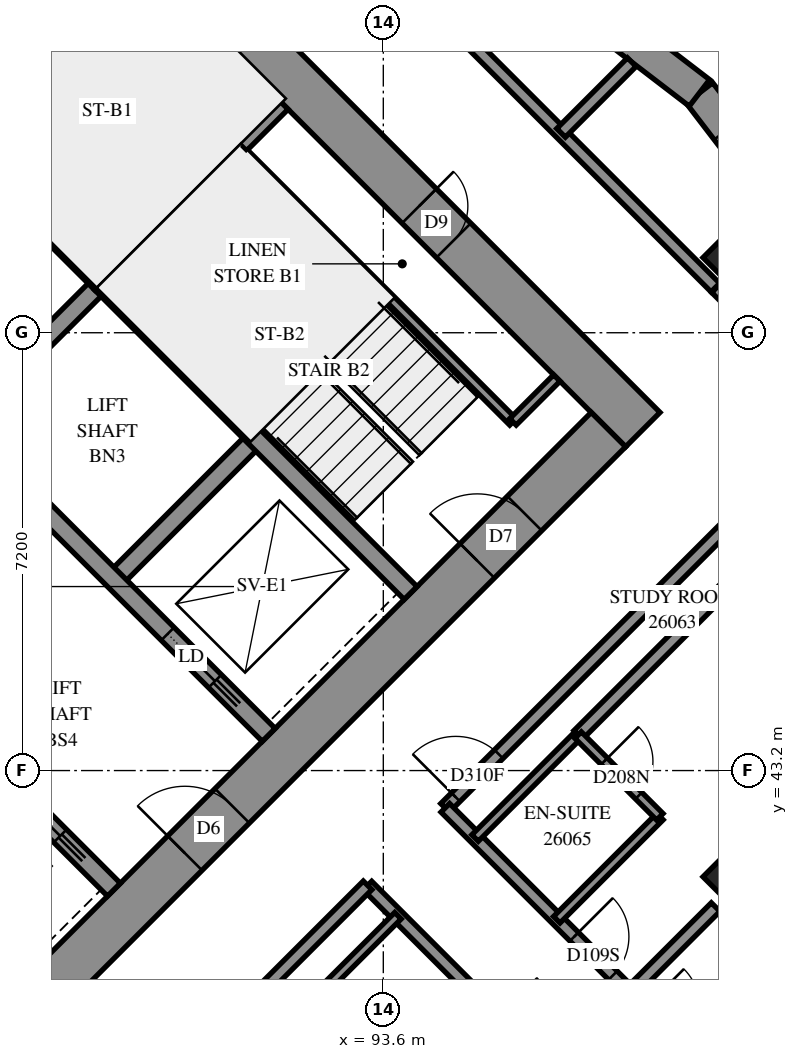
"""IFC4 building model, lengths in metres.
Left out: names, types, materials, properties, quantities, classifications, styles, units other than length and angle.
Written with IfcOpenShell. Run it as: python <this file> out.ifc"""

import sys

from ifc_helpers import new_model, si_unit, direction, frame, frame_2d, origin, origin_2d, place, context, subcontext, project, spatial, polyline, rectangle, outline, extrude, element, fill, save


model = new_model("IFC4")
c1 = context("Model", 3, precision=1e-05, world=origin(), true_north=direction((0.0, 1.0)))
c2 = subcontext(c1, "Body", "Model", "MODEL_VIEW")
j1 = project(units=[si_unit("LENGTHUNIT", "METRE"), si_unit("PLANEANGLEUNIT", "RADIAN")], contexts=[c1])
p1 = place(None, origin())
s1 = spatial("IfcSite", under=j1, at=p1, CompositionType="ELEMENT")
p2 = place(p1, origin())
s2 = spatial("IfcBuilding", under=s1, at=p2, CompositionType="ELEMENT")
p3 = place(p2, frame((0.0, 0.0, 98.2)))
s3 = spatial("IfcBuildingStorey", under=s2, at=p3, CompositionType="ELEMENT", Elevation=98.2)
for number, where, z_axis, x_axis in (
    (1, (99.565, 51.635, 0.0), (0.0, 0.0, 1.0), (0.707, -0.707, 0.0)),
    (2, (99.565, 41.453, 0.0), (0.0, 0.0, 1.0), (0.707, -0.707, 0.0)),
):
    element("IfcColumn", number, at=place(p3, frame(where, z_axis=z_axis, x_axis=x_axis)), inside=s3, PredefinedType="COLUMN", context=c2, shape_type="SweptSolid", body=[
        extrude(rectangle(XDim=1.0, YDim=1.0, at=origin_2d()), origin(), (0.0, 0.0, 1.0), 3.1),
    ])
p4 = place(p3, frame((86.554, 60.121, -0.3), z_axis=(0.0, 0.0, 1.0), x_axis=(0.7071067812, -0.7071067812, 0.0)))
e3 = element("IfcWall", 3, at=p4, inside=s3, PredefinedType="SHEAR", context=c2, shape_type="SweptSolid", body=[
    extrude(rectangle(XDim=16.0, YDim=0.8, at=frame_2d((8.0, 0.0))), origin(), (0.0, 0.0, 1.0), 2.7),
])
p5 = place(p4, frame((10.8, 0.0, 0.3)))
e4 = element("IfcOpeningElement", 4, at=p5, cuts=e3, PredefinedType="OPENING", context=c2, shape_type="SweptSolid", body=[
    extrude(rectangle(XDim=0.8, YDim=2.1, at=frame_2d((0.4, 1.05))), frame((0.0, 0.41, 0.0), z_axis=(0.0, -1.0, 0.0), x_axis=(1.0, 0.0, 0.0)), (0.0, 0.0, 1.0), 0.82),
])
p6 = place(p3, frame((87.12, 38.625, -0.3), z_axis=(0.0, 0.0, 1.0), x_axis=(0.7071067812, 0.7071067812, 0.0)))
e5 = element("IfcWall", 5, at=p6, inside=s3, PredefinedType="SHEAR", context=c2, shape_type="SweptSolid", body=[
    extrude(rectangle(XDim=14.4, YDim=0.8, at=frame_2d((7.2, 0.0))), origin(), (0.0, 0.0, 1.0), 2.7),
])
p7 = place(p6, frame((4.55, 0.0, 0.3)))
e6 = element("IfcOpeningElement", 6, at=p7, cuts=e5, PredefinedType="OPENING", context=c2, shape_type="SweptSolid", body=[
    extrude(rectangle(XDim=1.1, YDim=2.1, at=frame_2d((0.55, 1.05))), frame((0.0, 0.41, 0.0), z_axis=(0.0, -1.0, 0.0), x_axis=(1.0, 0.0, 0.0)), (0.0, 0.0, 1.0), 0.82),
])
p8 = place(p6, frame((11.35, 0.0, 0.3)))
e7 = element("IfcOpeningElement", 7, at=p8, cuts=e5, PredefinedType="OPENING", context=c2, shape_type="SweptSolid", body=[
    extrude(rectangle(XDim=1.1, YDim=2.1, at=frame_2d((0.55, 1.05))), frame((0.0, 0.41, 0.0), z_axis=(0.0, -1.0, 0.0), x_axis=(1.0, 0.0, 0.0)), (0.0, 0.0, 1.0), 0.82),
])
for number, where, z_axis, x_axis in (
    (8, (86.625, 48.878, 0.0), (0.0, 0.0, 1.0), (0.707, 0.707, 0.0)),
    (9, (89.17, 46.332, 0.0), (0.0, 0.0, 1.0), (0.707, 0.707, 0.0)),
):
    element("IfcWall", number, at=place(p3, frame(where, z_axis=z_axis, x_axis=x_axis)), inside=s3, PredefinedType="SOLIDWALL", context=c2, shape_type="SweptSolid", body=[
        extrude(rectangle(XDim=3.3, YDim=0.3, at=frame_2d((1.65, 0.0))), origin(), (0.0, 0.0, 1.0), 3.1),
    ])
p9 = place(p3, frame((78.988, 51.423, 0.0), z_axis=(0.0, 0.0, 1.0), x_axis=(0.7071067812, -0.7071067812, 0.0)))
e10 = element("IfcWall", 10, at=p9, inside=s3, PredefinedType="SOLIDWALL", context=c2, shape_type="SweptSolid", body=[
    extrude(rectangle(XDim=14.4, YDim=0.3, at=frame_2d((7.2, 0.0))), origin(), (0.0, 0.0, 1.0), 3.1),
])
p10 = place(p9, frame((1.25, 0.0, 0.0)))
e11 = element("IfcOpeningElement", 11, at=p10, cuts=e10, PredefinedType="OPENING", context=c2, shape_type="SweptSolid", body=[
    extrude(rectangle(XDim=1.1, YDim=2.1, at=frame_2d((0.55, 1.05))), frame((0.0, 0.16, 0.0), z_axis=(0.0, -1.0, 0.0), x_axis=(1.0, 0.0, 0.0)), (0.0, 0.0, 1.0), 0.32),
])
p11 = place(p9, frame((4.85, 0.0, 0.0)))
e12 = element("IfcOpeningElement", 12, at=p11, cuts=e10, PredefinedType="OPENING", context=c2, shape_type="SweptSolid", body=[
    extrude(rectangle(XDim=1.1, YDim=2.1, at=frame_2d((0.55, 1.05))), frame((0.0, 0.16, 0.0), z_axis=(0.0, -1.0, 0.0), x_axis=(1.0, 0.0, 0.0)), (0.0, 0.0, 1.0), 0.32),
])
p12 = place(p9, frame((8.45, 0.0, 0.0)))
e13 = element("IfcOpeningElement", 13, at=p12, cuts=e10, PredefinedType="OPENING", context=c2, shape_type="SweptSolid", body=[
    extrude(rectangle(XDim=1.1, YDim=2.1, at=frame_2d((0.55, 1.05))), frame((0.0, 0.16, 0.0), z_axis=(0.0, -1.0, 0.0), x_axis=(1.0, 0.0, 0.0)), (0.0, 0.0, 1.0), 0.32),
])
p13 = place(p9, frame((12.05, 0.0, 0.0)))
e14 = element("IfcOpeningElement", 14, at=p13, cuts=e10, PredefinedType="OPENING", context=c2, shape_type="SweptSolid", body=[
    extrude(rectangle(XDim=1.1, YDim=2.1, at=frame_2d((0.55, 1.05))), frame((0.0, 0.16, 0.0), z_axis=(0.0, -1.0, 0.0), x_axis=(1.0, 0.0, 0.0)), (0.0, 0.0, 1.0), 0.32),
])
p14 = place(p3, frame((81.534, 53.969, 0.0), z_axis=(0.0, 0.0, 1.0), x_axis=(0.707103309, -0.7071102534, 0.0)))
e15 = element("IfcWall", 15, at=p14, inside=s3, PredefinedType="SOLIDWALL", context=c2, shape_type="SweptSolid", body=[
    extrude(rectangle(XDim=14.4, YDim=0.3, at=frame_2d((7.2, 0.0))), origin(), (0.0, 0.0, 1.0), 3.1),
])
p15 = place(p14, frame((12.05, 0.0, 0.0)))
e16 = element("IfcOpeningElement", 16, at=p15, cuts=e15, PredefinedType="OPENING", context=c2, shape_type="SweptSolid", body=[
    extrude(rectangle(XDim=1.1, YDim=2.1, at=frame_2d((0.55, 1.05))), frame((0.0, 0.16, 0.0), z_axis=(0.0, -1.0, 0.0), x_axis=(1.0, 0.0, 0.0)), (0.0, 0.0, 1.0), 0.32),
])
for number, where, z_axis, x_axis in (
    (17, (83.867, 56.302, 0.0), (0.0, 0.0, 1.0), (0.707, -0.707, 0.0)),
    (18, (88.958, 51.211, 0.0), (0.0, 0.0, 1.0), (0.707, -0.707, 0.0)),
):
    element("IfcWall", number, at=place(p3, frame(where, z_axis=z_axis, x_axis=x_axis)), inside=s3, PredefinedType="SOLIDWALL", context=c2, shape_type="SweptSolid", body=[
        extrude(rectangle(XDim=7.2, YDim=0.3, at=frame_2d((3.6, 0.0))), origin(), (0.0, 0.0, 1.0), 3.1),
    ])
p16 = place(p3, frame((88.958, 51.211, 0.0), z_axis=(0.0, 0.0, 1.0), x_axis=(0.7071067812, 0.7071067812, 0.0)))
e19 = element("IfcWall", 19, at=p16, inside=s3, PredefinedType="SOLIDWALL", context=c2, shape_type="SweptSolid", body=[
    extrude(rectangle(XDim=4.2, YDim=0.3, at=frame_2d((2.1, 0.0))), origin(), (0.0, 0.0, 1.0), 3.1),
])
p17 = place(p3, frame((100.891, 51.614, 0.0), z_axis=(0.0, 0.0, 1.0), x_axis=(-0.6082581669, 0.7937392534, 0.0)))
e20 = element("IfcWall", 20, at=p17, inside=s3, PredefinedType="SOLIDWALL", context=c2, shape_type="SweptSolid", body=[
    extrude(outline(polyline([(0.036, -0.275), (3.475, -0.275), (3.403, 0.275), (-0.036, 0.275), (0.036, -0.275)])), origin(), (0.0, 0.0, 1.0), 3.1),
])
p18 = place(p17, frame((1.482, 0.0, 0.5)))
e21 = element("IfcOpeningElement", 21, at=p18, cuts=e20, PredefinedType="OPENING", context=c2, shape_type="SweptSolid", body=[
    extrude(rectangle(XDim=1.2, YDim=2.45, at=frame_2d((0.6, 1.225))), frame((0.0, 0.285, 0.0), z_axis=(0.0, -1.0, 0.0), x_axis=(1.0, 0.0, 0.0)), (0.0, 0.0, 1.0), 0.57),
])
p19 = place(p3, frame((98.799, 54.344, 0.0), z_axis=(0.0, 0.0, 1.0), x_axis=(-0.7937392534, 0.6082581669, 0.0)))
e22 = element("IfcWall", 22, at=p19, inside=s3, PredefinedType="SOLIDWALL", context=c2, shape_type="SweptSolid", body=[
    extrude(outline(polyline([(-0.036, -0.275), (3.403, -0.275), (3.475, 0.275), (0.036, 0.275), (-0.036, -0.275)])), origin(), (0.0, 0.0, 1.0), 3.1),
])
p20 = place(p19, frame((1.596, 0.0, 0.5)))
e23 = element("IfcOpeningElement", 23, at=p20, cuts=e22, PredefinedType="OPENING", context=c2, shape_type="SweptSolid", body=[
    extrude(rectangle(XDim=1.2, YDim=2.45, at=frame_2d((0.6, 1.225))), frame((0.0, 0.285, 0.0), z_axis=(0.0, -1.0, 0.0), x_axis=(1.0, 0.0, 0.0)), (0.0, 0.0, 1.0), 0.57),
])
p21 = place(p3, frame((91.313, 53.354, 0.0), z_axis=(0.0, 0.0, 1.0), x_axis=(0.7071147811, -0.7070987812, 0.0)))
e24 = element("IfcWall", 24, at=p21, inside=s3, PredefinedType="PARTITIONING", context=c2, shape_type="SweptSolid", body=[
    extrude(rectangle(XDim=6.25, YDim=0.15, at=frame_2d((3.125, 0.0))), origin(), (0.0, 0.0, 1.0), 3.1),
])
p22 = place(p3, frame((95.732, 48.934, 0.0), z_axis=(0.0, 0.0, 1.0), x_axis=(0.7071067812, 0.7071067812, 0.0)))
e25 = element("IfcWall", 25, at=p22, inside=s3, PredefinedType="PARTITIONING", context=c2, shape_type="SweptSolid", body=[
    extrude(rectangle(XDim=1.02, YDim=0.15, at=frame_2d((0.51, 0.0))), origin(), (0.0, 0.0, 1.0), 3.1),
])
p23 = place(p3, frame((93.339, 41.309, 0.0), z_axis=(0.0, 0.0, 1.0), x_axis=(0.7071067812, -0.7071067812, 0.0)))
e26 = element("IfcWall", 26, at=p23, inside=s3, PredefinedType="PARTITIONING", context=c2, shape_type="SweptSolid", body=[
    extrude(rectangle(XDim=18.702, YDim=0.2, at=frame_2d((9.351, 0.0))), origin(), (0.0, 0.0, 1.0), 3.1),
])
p24 = place(p23, frame((3.05, 0.0, 0.0)))
e27 = element("IfcOpeningElement", 27, at=p24, cuts=e26, PredefinedType="OPENING", context=c2, shape_type="SweptSolid", body=[
    extrude(rectangle(XDim=0.9, YDim=2.1, at=frame_2d((0.45, 1.05))), frame((0.0, 0.11, 0.0), z_axis=(0.0, -1.0, 0.0), x_axis=(1.0, 0.0, 0.0)), (0.0, 0.0, 1.0), 0.22),
])
p25 = place(p23, frame((4.7, 0.0, 0.0)))
e28 = element("IfcOpeningElement", 28, at=p25, cuts=e26, PredefinedType="OPENING", context=c2, shape_type="SweptSolid", body=[
    extrude(rectangle(XDim=0.9, YDim=2.1, at=frame_2d((0.45, 1.05))), frame((0.0, 0.11, 0.0), z_axis=(0.0, -1.0, 0.0), x_axis=(1.0, 0.0, 0.0)), (0.0, 0.0, 1.0), 0.22),
])
p26 = place(p23, frame((10.149, 0.0, 0.0)))
e29 = element("IfcOpeningElement", 29, at=p26, cuts=e26, PredefinedType="OPENING", context=c2, shape_type="SweptSolid", body=[
    extrude(rectangle(XDim=0.9, YDim=2.1, at=frame_2d((0.45, 1.05))), frame((0.0, 0.11, 0.0), z_axis=(0.0, -1.0, 0.0), x_axis=(1.0, 0.0, 0.0)), (0.0, 0.0, 1.0), 0.22),
])
p27 = place(p23, frame((11.9, 0.0, 0.0)))
e30 = element("IfcOpeningElement", 30, at=p27, cuts=e26, PredefinedType="OPENING", context=c2, shape_type="SweptSolid", body=[
    extrude(rectangle(XDim=0.9, YDim=2.1, at=frame_2d((0.45, 1.05))), frame((0.0, 0.11, 0.0), z_axis=(0.0, -1.0, 0.0), x_axis=(1.0, 0.0, 0.0)), (0.0, 0.0, 1.0), 0.22),
])
p28 = place(p23, frame((17.45, 0.0, 0.0)))
e31 = element("IfcOpeningElement", 31, at=p28, cuts=e26, PredefinedType="OPENING", context=c2, shape_type="SweptSolid", body=[
    extrude(rectangle(XDim=0.9, YDim=2.1, at=frame_2d((0.45, 1.05))), frame((0.0, 0.11, 0.0), z_axis=(0.0, -1.0, 0.0), x_axis=(1.0, 0.0, 0.0)), (0.0, 0.0, 1.0), 0.22),
])
p29 = place(p3, frame((86.835, 34.806, 0.0), z_axis=(0.0, 0.0, 1.0), x_axis=(0.7071067812, 0.7071067812, 0.0)))
e32 = element("IfcWall", 32, at=p29, inside=s3, PredefinedType="PARTITIONING", context=c2, shape_type="SweptSolid", body=[
    extrude(rectangle(XDim=9.201, YDim=0.2, at=frame_2d((4.601, 0.0))), origin(), (0.0, 0.0, 1.0), 3.1),
])
p30 = place(p3, frame((94.615, 42.587, 0.0), z_axis=(0.0, 0.0, 1.0), x_axis=(0.7071067812, 0.7071067812, 0.0)))
e33 = element("IfcWall", 33, at=p30, inside=s3, PredefinedType="PARTITIONING", context=c2, shape_type="SweptSolid", body=[
    extrude(rectangle(XDim=9.198, YDim=0.2, at=frame_2d((4.599, 0.0))), origin(), (0.0, 0.0, 1.0), 3.1),
])
p31 = place(p30, frame((0.248, 0.0, 0.0)))
e34 = element("IfcOpeningElement", 34, at=p31, cuts=e33, PredefinedType="OPENING", context=c2, shape_type="SweptSolid", body=[
    extrude(rectangle(XDim=1.0, YDim=2.1, at=frame_2d((0.5, 1.05))), frame((0.0, 0.11, 0.0), z_axis=(0.0, -1.0, 0.0), x_axis=(1.0, 0.0, 0.0)), (0.0, 0.0, 1.0), 0.22),
])
p32 = place(p3, frame((96.805, 43.787, 0.0), z_axis=(0.0, 0.0, 1.0), x_axis=(0.7071126661, 0.7071008962, 0.0)))
e35 = element("IfcWall", 35, at=p32, inside=s3, PredefinedType="PARTITIONING", context=c2, shape_type="SweptSolid", body=[
    extrude(rectangle(XDim=8.496, YDim=0.2, at=frame_2d((4.248, 0.0))), origin(), (0.0, 0.0, 1.0), 3.1),
])
p33 = place(p3, frame((94.62, 42.587, 0.0), z_axis=(0.0, 0.0, 1.0), x_axis=(0.7071067812, -0.7071067812, 0.0)))
e36 = element("IfcWall", 36, at=p33, inside=s3, PredefinedType="PARTITIONING", context=c2, shape_type="SweptSolid", body=[
    extrude(rectangle(XDim=7.9, YDim=0.2, at=frame_2d((3.95, 0.0))), origin(), (0.0, 0.0, 1.0), 3.1),
])
p34 = place(p33, frame((2.998, 0.0, 0.0)))
e37 = element("IfcOpeningElement", 37, at=p34, cuts=e36, PredefinedType="OPENING", context=c2, shape_type="SweptSolid", body=[
    extrude(rectangle(XDim=0.9, YDim=2.1, at=frame_2d((0.45, 1.05))), frame((0.0, 0.11, 0.0), z_axis=(0.0, -1.0, 0.0), x_axis=(1.0, 0.0, 0.0)), (0.0, 0.0, 1.0), 0.22),
])
p35 = place(p33, frame((4.649, 0.0, 0.0)))
e38 = element("IfcOpeningElement", 38, at=p35, cuts=e36, PredefinedType="OPENING", context=c2, shape_type="SweptSolid", body=[
    extrude(rectangle(XDim=0.9, YDim=2.1, at=frame_2d((0.45, 1.05))), frame((0.0, 0.11, 0.0), z_axis=(0.0, -1.0, 0.0), x_axis=(1.0, 0.0, 0.0)), (0.0, 0.0, 1.0), 0.22),
])
p36 = place(p3, frame((93.981, 56.223, 0.0), z_axis=(0.0, 0.0, 1.0), x_axis=(0.7071067812, -0.7071067812, 0.0)))
e39 = element("IfcWall", 39, at=p36, inside=s3, PredefinedType="PARTITIONING", context=c2, shape_type="SweptSolid", body=[
    extrude(rectangle(XDim=7.184, YDim=0.2, at=frame_2d((3.592, 0.0))), origin(), (0.0, 0.0, 1.0), 3.1),
])
p37 = place(p3, frame((99.071, 51.133, 0.0), z_axis=(0.0, 0.0, 1.0), x_axis=(0.7071067812, -0.7071067812, 0.0)))
e40 = element("IfcWall", 40, at=p37, inside=s3, PredefinedType="PARTITIONING", context=c2, shape_type="SweptSolid", body=[
    extrude(rectangle(XDim=2.893, YDim=0.2, at=frame_2d((1.447, 0.0))), origin(), (0.0, 0.0, 1.0), 3.1),
])
p38 = place(p3, frame((92.143, 39.117, 0.0), z_axis=(0.0, 0.0, 1.0), x_axis=(0.7075233388, 0.706689978, 0.0)))
e41 = element("IfcWall", 41, at=p38, inside=s3, PredefinedType="PARTITIONING", context=c2, shape_type="SweptSolid", body=[
    extrude(rectangle(XDim=2.4, YDim=0.15, at=frame_2d((1.2, 0.0))), origin(), (0.0, 0.0, 1.0), 3.1),
])
for number, where, z_axis, x_axis in (
    (42, (96.453, 40.747, 0.0), (0.0, 0.0, 1.0), (0.707, 0.707, 0.0)),
    (43, (95.109, 42.091, 0.0), (0.0, 0.0, 1.0), (0.707, 0.707, 0.0)),
    (44, (98.857, 38.343, 0.0), (0.0, 0.0, 1.0), (0.707, 0.707, 0.0)),
):
    element("IfcWall", number, at=place(p3, frame(where, z_axis=z_axis, x_axis=x_axis)), inside=s3, PredefinedType="PARTITIONING", context=c2, shape_type="SweptSolid", body=[
        extrude(rectangle(XDim=2.398, YDim=0.15, at=frame_2d((1.199, 0.0))), origin(), (0.0, 0.0, 1.0), 3.1),
    ])
p39 = place(p3, frame((97.655, 39.545, 0.0), z_axis=(0.0, 0.0, 1.0), x_axis=(0.7071067812, 0.7071067812, 0.0)))
e45 = element("IfcWall", 45, at=p39, inside=s3, PredefinedType="PARTITIONING", context=c2, shape_type="SweptSolid", body=[
    extrude(rectangle(XDim=1.994, YDim=0.2, at=frame_2d((0.997, 0.0))), origin(), (0.0, 0.0, 1.0), 3.1),
])
p40 = place(p3, frame((96.803, 43.783, 0.0), z_axis=(0.0, 0.0, 1.0), x_axis=(0.7071067812, -0.7071067812, 0.0)))
e46 = element("IfcWall", 46, at=p40, inside=s3, PredefinedType="PARTITIONING", context=c2, shape_type="SweptSolid", body=[
    extrude(rectangle(XDim=1.901, YDim=0.15, at=frame_2d((0.95, 0.0))), origin(), (0.0, 0.0, 1.0), 3.1),
])
p41 = place(p40, frame((0.609, 0.0, 0.0)))
e47 = element("IfcOpeningElement", 47, at=p41, cuts=e46, PredefinedType="OPENING", context=c2, shape_type="SweptSolid", body=[
    extrude(rectangle(XDim=0.8, YDim=2.1, at=frame_2d((0.4, 1.05))), frame((0.0, 0.085, 0.0), z_axis=(0.0, -1.0, 0.0), x_axis=(1.0, 0.0, 0.0)), (0.0, 0.0, 1.0), 0.17),
])
p42 = place(p3, frame((96.523, 53.687, 0.0), z_axis=(0.0, 0.0, 1.0), x_axis=(0.7070763817, 0.7071371793, 0.0)))
e48 = element("IfcWall", 48, at=p42, inside=s3, PredefinedType="PARTITIONING", context=c2, shape_type="SweptSolid", body=[
    extrude(rectangle(XDim=1.645, YDim=0.2, at=frame_2d((0.822, 0.0))), origin(), (0.0, 0.0, 1.0), 3.1),
])
p43 = place(p5, origin())
e49 = element("IfcDoor", 49, at=p43, inside=s3, OperationType="SINGLE_SWING_RIGHT", PredefinedType="DOOR", context=c2, shape_type="SweptSolid", body=[
    extrude(rectangle(XDim=0.8, YDim=2.1, at=frame_2d((0.4, 1.05))), frame((0.0, -0.34, 0.0), z_axis=(0.0, -1.0, 0.0), x_axis=(1.0, 0.0, 0.0)), (0.0, 0.0, 1.0), 0.05),
])
fill(e4, e49)
p44 = place(p7, origin())
e50 = element("IfcDoor", 50, at=p44, inside=s3, OperationType="DOUBLE_DOOR_SINGLE_SWING", PredefinedType="DOOR", context=c2, shape_type="SweptSolid", body=[
    extrude(rectangle(XDim=1.1, YDim=2.1, at=frame_2d((0.55, 1.05))), frame((0.0, 0.025, 0.0), z_axis=(0.0, -1.0, 0.0), x_axis=(1.0, 0.0, 0.0)), (0.0, 0.0, 1.0), 0.05),
])
fill(e6, e50)
p45 = place(p8, origin())
e51 = element("IfcDoor", 51, at=p45, inside=s3, OperationType="SINGLE_SWING_RIGHT", PredefinedType="DOOR", context=c2, shape_type="SweptSolid", body=[
    extrude(rectangle(XDim=1.1, YDim=2.1, at=frame_2d((0.55, 1.05))), frame((0.0, 0.025, 0.0), z_axis=(0.0, -1.0, 0.0), x_axis=(1.0, 0.0, 0.0)), (0.0, 0.0, 1.0), 0.05),
])
fill(e7, e51)
p46 = place(p13, origin())
e52 = element("IfcDoor", 52, at=p46, inside=s3, OperationType="SLIDING_TO_RIGHT", PredefinedType="DOOR", context=c2, shape_type="SweptSolid", body=[
    extrude(rectangle(XDim=1.1, YDim=2.1, at=frame_2d((0.55, 1.05))), frame((0.0, 0.025, 0.0), z_axis=(0.0, -1.0, 0.0), x_axis=(1.0, 0.0, 0.0)), (0.0, 0.0, 1.0), 0.05),
])
fill(e14, e52)
p47 = place(p15, origin())
e53 = element("IfcDoor", 53, at=p47, inside=s3, OperationType="SLIDING_TO_RIGHT", PredefinedType="DOOR", context=c2, shape_type="SweptSolid", body=[
    extrude(rectangle(XDim=1.1, YDim=2.1, at=frame_2d((0.55, 1.05))), frame((0.0, 0.025, 0.0), z_axis=(0.0, -1.0, 0.0), x_axis=(1.0, 0.0, 0.0)), (0.0, 0.0, 1.0), 0.05),
])
fill(e16, e53)
p48 = place(p31, origin())
e54 = element("IfcDoor", 54, at=p48, inside=s3, OperationType="SINGLE_SWING_RIGHT", PredefinedType="DOOR", context=c2, shape_type="SweptSolid", body=[
    extrude(rectangle(XDim=1.0, YDim=2.1, at=frame_2d((0.5, 1.05))), frame((0.0, 0.025, 0.0), z_axis=(0.0, -1.0, 0.0), x_axis=(1.0, 0.0, 0.0)), (0.0, 0.0, 1.0), 0.05),
])
fill(e34, e54)
p49 = place(p34, origin())
e55 = element("IfcDoor", 55, at=p49, inside=s3, OperationType="SINGLE_SWING_RIGHT", PredefinedType="DOOR", context=c2, shape_type="SweptSolid", body=[
    extrude(rectangle(XDim=0.9, YDim=2.1, at=frame_2d((0.45, 1.05))), frame((0.0, 0.025, 0.0), z_axis=(0.0, -1.0, 0.0), x_axis=(1.0, 0.0, 0.0)), (0.0, 0.0, 1.0), 0.05),
])
fill(e37, e55)
p50 = place(p41, origin())
e56 = element("IfcDoor", 56, at=p50, inside=s3, OperationType="SINGLE_SWING_RIGHT", PredefinedType="DOOR", context=c2, shape_type="SweptSolid", body=[
    extrude(rectangle(XDim=0.8, YDim=2.1, at=frame_2d((0.4, 1.05))), frame((0.0, 0.025, 0.0), z_axis=(0.0, -1.0, 0.0), x_axis=(1.0, 0.0, 0.0)), (0.0, 0.0, 1.0), 0.05),
])
fill(e47, e56)
save(model, sys.argv[1])
